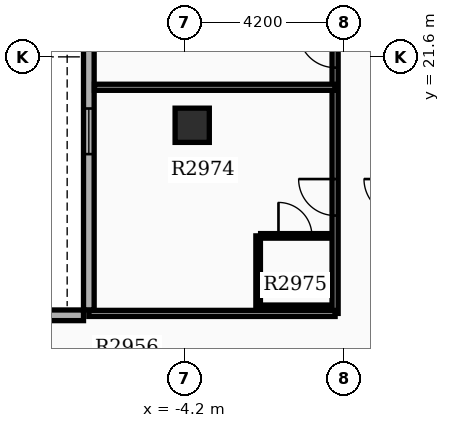
"""IFC4 building model, lengths in metres.
Left out: names, types, materials, properties, quantities, classifications, styles, units other than length and angle.
Written with IfcOpenShell. Run it as: python <this file> out.ifc"""

import sys

from ifc_helpers import new_model, si_unit, direction, frame, frame_2d, origin, origin_2d, place, context, subcontext, project, spatial, rectangle, extrude, element, fill, save


model = new_model("IFC4")
c1 = context("Model", 3, precision=1e-05, world=origin(), true_north=direction((0.0, 1.0)))
c2 = subcontext(c1, "Body", "Model", "MODEL_VIEW")
j1 = project(units=[si_unit("LENGTHUNIT", "METRE"), si_unit("PLANEANGLEUNIT", "RADIAN")], contexts=[c1])
p1 = place(None, origin())
s1 = spatial("IfcSite", under=j1, at=p1, CompositionType="ELEMENT")
p2 = place(p1, origin())
s2 = spatial("IfcBuilding", under=s1, at=p2, CompositionType="ELEMENT")
p3 = place(p2, frame((0.0, 0.0, 183.9)))
s3 = spatial("IfcBuildingStorey", under=s2, at=p3, CompositionType="ELEMENT", Elevation=183.9)
p4 = place(p3, frame((-4.0, 19.8, 0.0), z_axis=(0.0, 0.0, 1.0), x_axis=(1.0, 0.0, 0.0)))
e1 = element("IfcColumn", 1, at=p4, inside=s3, PredefinedType="COLUMN", context=c2, shape_type="SweptSolid", body=[
    extrude(rectangle(XDim=0.9, YDim=0.9, at=origin_2d()), origin(), (0.0, 0.0, 1.0), 3.9),
])
p5 = place(p3, frame((-6.72, 35.04, 0.0), z_axis=(0.0, 0.0, 1.0), x_axis=(0.0, -1.0, 0.0)))
e2 = element("IfcWall", 2, at=p5, inside=s3, PredefinedType="STANDARD", context=c2, shape_type="SweptSolid", body=[
    extrude(rectangle(XDim=20.1, YDim=0.28, at=frame_2d((10.05, 0.0))), origin(), (0.0, 0.0, 1.0), 2.97),
])
p6 = place(p5, frame((0.85, 0.0, 0.8)))
e3 = element("IfcOpeningElement", 3, at=p6, cuts=e2, PredefinedType="OPENING", context=c2, shape_type="SweptSolid", body=[
    extrude(rectangle(XDim=1.4, YDim=1.6, at=frame_2d((0.7, 0.8))), frame((0.0, 0.15, 0.0), z_axis=(0.0, -1.0, 0.0), x_axis=(1.0, 0.0, 0.0)), (0.0, 0.0, 1.0), 0.3),
])
p7 = place(p5, frame((4.05, 0.0, 0.8)))
e4 = element("IfcOpeningElement", 4, at=p7, cuts=e2, PredefinedType="OPENING", context=c2, shape_type="SweptSolid", body=[
    extrude(rectangle(XDim=1.4, YDim=1.6, at=frame_2d((0.7, 0.8))), frame((0.0, 0.15, 0.0), z_axis=(0.0, -1.0, 0.0), x_axis=(1.0, 0.0, 0.0)), (0.0, 0.0, 1.0), 0.3),
])
p8 = place(p5, frame((7.25, 0.0, 0.8)))
e5 = element("IfcOpeningElement", 5, at=p8, cuts=e2, PredefinedType="OPENING", context=c2, shape_type="SweptSolid", body=[
    extrude(rectangle(XDim=1.4, YDim=1.6, at=frame_2d((0.7, 0.8))), frame((0.0, 0.15, 0.0), z_axis=(0.0, -1.0, 0.0), x_axis=(1.0, 0.0, 0.0)), (0.0, 0.0, 1.0), 0.3),
])
p9 = place(p5, frame((10.95, 0.0, 0.8)))
e6 = element("IfcOpeningElement", 6, at=p9, cuts=e2, PredefinedType="OPENING", context=c2, shape_type="SweptSolid", body=[
    extrude(rectangle(XDim=1.4, YDim=1.6, at=frame_2d((0.7, 0.8))), frame((0.0, 0.15, 0.0), z_axis=(0.0, -1.0, 0.0), x_axis=(1.0, 0.0, 0.0)), (0.0, 0.0, 1.0), 0.3),
])
p10 = place(p5, frame((14.799, 0.0, 0.85)))
e7 = element("IfcOpeningElement", 7, at=p10, cuts=e2, PredefinedType="OPENING", context=c2, shape_type="SweptSolid", body=[
    extrude(rectangle(XDim=1.2, YDim=1.6, at=frame_2d((0.6, 0.8))), frame((0.0, 0.15, 0.0), z_axis=(0.0, -1.0, 0.0), x_axis=(1.0, 0.0, 0.0)), (0.0, 0.0, 1.0), 0.3),
])
p11 = place(p3, frame((-13.16, 14.8, 0.0), z_axis=(0.0, 0.0, 1.0), x_axis=(1.0, 0.0, 0.0)))
e8 = element("IfcWall", 8, at=p11, inside=s3, PredefinedType="STANDARD", context=c2, shape_type="SweptSolid", body=[
    extrude(rectangle(XDim=6.3, YDim=0.28, at=frame_2d((3.15, 0.0))), origin(), (0.0, 0.0, 1.0), 2.97),
])
p12 = place(p3, frame((-0.24, 14.85, 0.0), z_axis=(0.0, 0.0, 1.0), x_axis=(0.0, 1.0, 0.0)))
e9 = element("IfcWall", 9, at=p12, inside=s3, PredefinedType="PARTITIONING", context=c2, shape_type="SweptSolid", body=[
    extrude(rectangle(XDim=9.7, YDim=0.16, at=frame_2d((4.85, 0.0))), origin(), (0.0, 0.0, 1.0), 2.96),
])
p13 = place(p12, frame((2.575, 0.0, 0.0)))
e10 = element("IfcOpeningElement", 10, at=p13, cuts=e9, PredefinedType="OPENING", context=c2, shape_type="SweptSolid", body=[
    extrude(rectangle(XDim=0.96, YDim=2.15, at=frame_2d((0.48, 1.075))), frame((0.0, 0.09, 0.0), z_axis=(0.0, -1.0, 0.0), x_axis=(1.0, 0.0, 0.0)), (0.0, 0.0, 1.0), 0.18),
])
p14 = place(p12, frame((6.467, 0.0, 0.0)))
e11 = element("IfcOpeningElement", 11, at=p14, cuts=e9, PredefinedType="OPENING", context=c2, shape_type="SweptSolid", body=[
    extrude(rectangle(XDim=0.96, YDim=2.15, at=frame_2d((0.48, 1.075))), frame((0.0, 0.09, 0.0), z_axis=(0.0, -1.0, 0.0), x_axis=(1.0, 0.0, 0.0)), (0.0, 0.0, 1.0), 0.18),
])
p15 = place(p3, frame((-0.24, 14.85, 0.0), z_axis=(0.0, 0.0, 1.0), x_axis=(-1.0, 0.0, 0.0)))
e12 = element("IfcWall", 12, at=p15, inside=s3, PredefinedType="PARTITIONING", context=c2, shape_type="SweptSolid", body=[
    extrude(rectangle(XDim=6.48, YDim=0.16, at=frame_2d((3.24, 0.0))), origin(), (0.0, 0.0, 1.0), 2.96),
])
p16 = place(p3, frame((-0.24, 20.8, 0.0), z_axis=(0.0, 0.0, 1.0), x_axis=(-1.0, 0.0, 0.0)))
e13 = element("IfcWall", 13, at=p16, inside=s3, PredefinedType="PARTITIONING", context=c2, shape_type="SweptSolid", body=[
    extrude(rectangle(XDim=6.332, YDim=0.16, at=frame_2d((3.166, 0.0))), origin(), (0.0, 0.0, 1.0), 2.96),
])
p17 = place(p3, frame((-2.2, 16.89, 0.0), z_axis=(0.0, 0.0, 1.0), x_axis=(1.0, 0.0, 0.0)))
e14 = element("IfcWall", 14, at=p17, inside=s3, PredefinedType="PARTITIONING", context=c2, shape_type="SweptSolid", body=[
    extrude(rectangle(XDim=1.82, YDim=0.12, at=frame_2d((0.91, 0.0))), origin(), (0.0, 0.0, 1.0), 2.96),
])
p18 = place(p17, frame((0.47, 0.0, 0.0)))
e15 = element("IfcOpeningElement", 15, at=p18, cuts=e14, PredefinedType="OPENING", context=c2, shape_type="SweptSolid", body=[
    extrude(rectangle(XDim=0.88, YDim=2.1, at=frame_2d((0.44, 1.05))), frame((0.0, 0.07, 0.0), z_axis=(0.0, -1.0, 0.0), x_axis=(1.0, 0.0, 0.0)), (0.0, 0.0, 1.0), 0.14),
])
p19 = place(p3, frame((-2.2, 15.01, 0.0), z_axis=(0.0, 0.0, 1.0), x_axis=(1.0, 0.0, 0.0)))
e16 = element("IfcWall", 16, at=p19, inside=s3, PredefinedType="PARTITIONING", context=c2, shape_type="SweptSolid", body=[
    extrude(rectangle(XDim=1.82, YDim=0.12, at=frame_2d((0.91, 0.0))), origin(), (0.0, 0.0, 1.0), 2.96),
])
p20 = place(p3, frame((-2.265, 15.01, 0.0), z_axis=(0.0, 0.0, 1.0), x_axis=(0.0, 1.0, 0.0)))
e17 = element("IfcWall", 17, at=p20, inside=s3, PredefinedType="PARTITIONING", context=c2, shape_type="SweptSolid", body=[
    extrude(rectangle(XDim=1.88, YDim=0.12, at=frame_2d((0.94, 0.0))), origin(), (0.0, 0.0, 1.0), 2.96),
])
p21 = place(p10, origin())
e18 = element("IfcWindow", 18, at=p21, inside=s3, PartitioningType="SINGLE_PANEL", PredefinedType="WINDOW", context=c2, shape_type="SweptSolid", body=[
    extrude(rectangle(XDim=1.2, YDim=1.6, at=frame_2d((0.6, 0.8))), frame((0.0, 0.03, 0.0), z_axis=(0.0, -1.0, 0.0), x_axis=(1.0, 0.0, 0.0)), (0.0, 0.0, 1.0), 0.06),
])
fill(e7, e18)
p22 = place(p13, origin())
e19 = element("IfcDoor", 19, at=p22, inside=s3, OperationType="SINGLE_SWING_RIGHT", PredefinedType="DOOR", context=c2, shape_type="SweptSolid", body=[
    extrude(rectangle(XDim=0.96, YDim=2.15, at=frame_2d((0.48, 1.075))), frame((0.0, 0.025, 0.0), z_axis=(0.0, -1.0, 0.0), x_axis=(1.0, 0.0, 0.0)), (0.0, 0.0, 1.0), 0.05),
])
fill(e10, e19)
p23 = place(p18, origin())
e20 = element("IfcDoor", 20, at=p23, inside=s3, OperationType="SINGLE_SWING_LEFT", PredefinedType="DOOR", context=c2, shape_type="SweptSolid", body=[
    extrude(rectangle(XDim=0.88, YDim=2.1, at=frame_2d((0.44, 1.05))), frame((0.0, 0.025, 0.0), z_axis=(0.0, -1.0, 0.0), x_axis=(1.0, 0.0, 0.0)), (0.0, 0.0, 1.0), 0.05),
])
fill(e15, e20)
p24 = place(p14, origin())
e21 = element("IfcDoor", 21, at=p24, inside=s3, OperationType="SINGLE_SWING_RIGHT", PredefinedType="DOOR", context=c2, shape_type="SweptSolid", body=[
    extrude(rectangle(XDim=0.96, YDim=2.15, at=frame_2d((0.48, 1.075))), frame((0.0, 0.025, 0.0), z_axis=(0.0, -1.0, 0.0), x_axis=(1.0, 0.0, 0.0)), (0.0, 0.0, 1.0), 0.05),
])
fill(e11, e21)
save(model, sys.argv[1])
